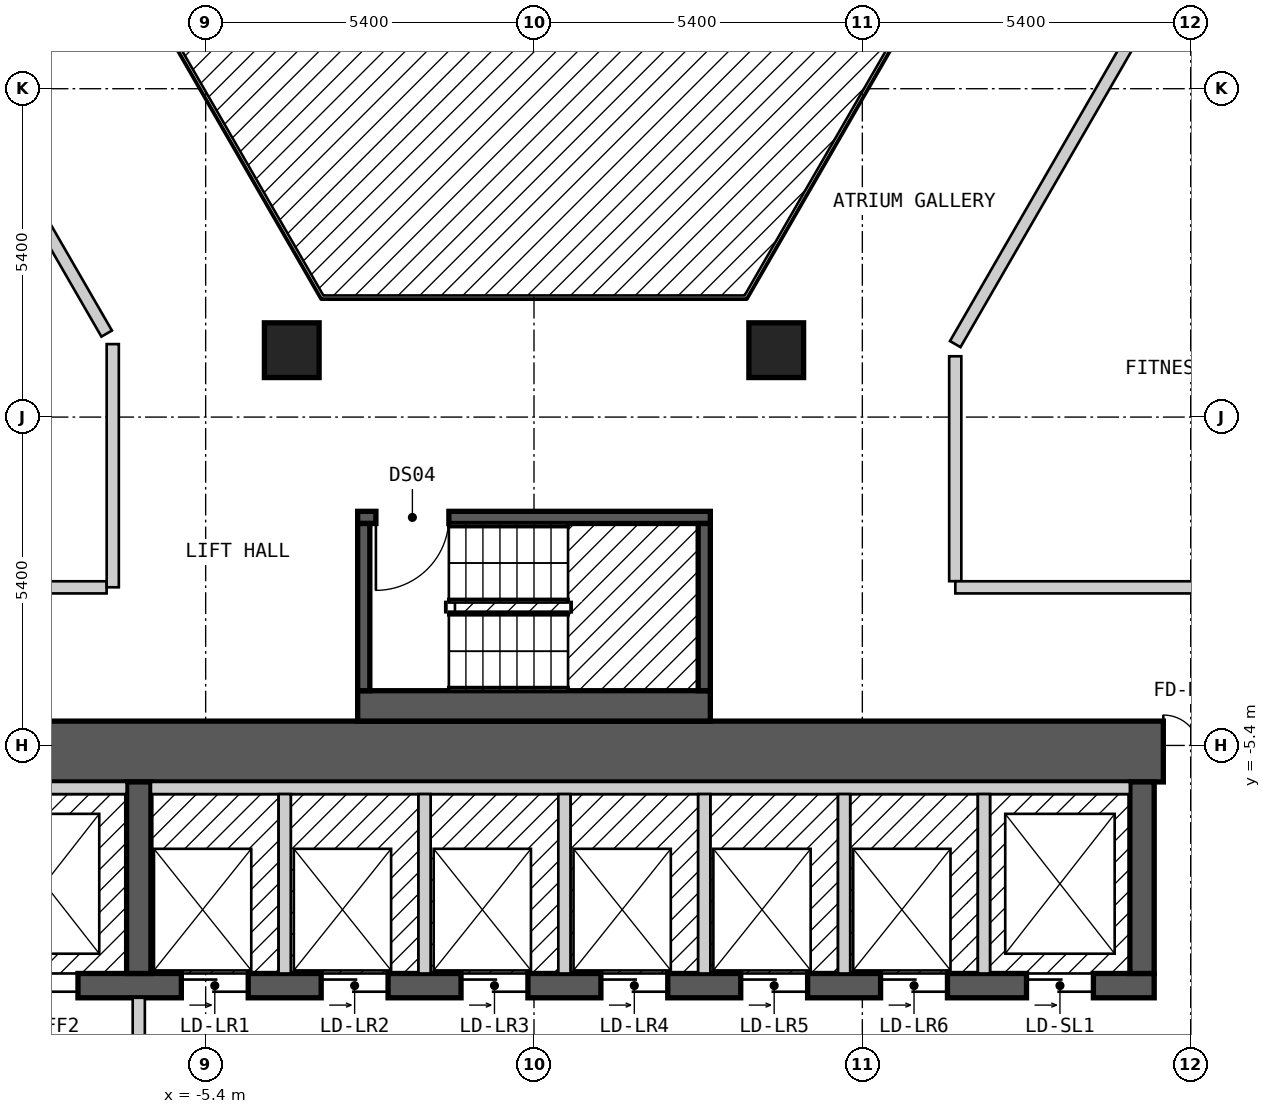
"""IFC4 building model, lengths in metres.
Left out: names, types, materials, properties, quantities, classifications, styles, units other than length and angle.
Written with IfcOpenShell. Run it as: python <this file> out.ifc"""

import sys

from ifc_helpers import new_model, si_unit, direction, frame, frame_2d, origin, origin_2d, place, context, subcontext, project, spatial, rectangle, extrude, element, fill, save


model = new_model("IFC4")
c1 = context("Model", 3, precision=1e-05, world=origin(), true_north=direction((0.0, 1.0)))
c2 = subcontext(c1, "Body", "Model", "MODEL_VIEW")
j1 = project(units=[si_unit("LENGTHUNIT", "METRE"), si_unit("PLANEANGLEUNIT", "RADIAN")], contexts=[c1])
p1 = place(None, origin())
s1 = spatial("IfcSite", under=j1, at=p1, CompositionType="ELEMENT")
p2 = place(p1, origin())
s2 = spatial("IfcBuilding", under=s1, at=p2, CompositionType="ELEMENT")
p3 = place(p2, frame((0.0, 0.0, 99.0)))
s3 = spatial("IfcBuildingStorey", under=s2, at=p3, CompositionType="ELEMENT", Elevation=99.0)
for number, where, z_axis, x_axis in (
    (1, (3.984, 1.1, 0.0), (0.0, 0.0, 1.0), (1.0, 0.0, 0.0)),
    (2, (-3.984, 1.1, 0.0), (0.0, 0.0, 1.0), (1.0, 0.0, 0.0)),
):
    element("IfcColumn", number, at=place(p3, frame(where, z_axis=z_axis, x_axis=x_axis)), inside=s3, PredefinedType="COLUMN", context=c2, shape_type="SweptSolid", body=[
        extrude(rectangle(XDim=0.9, YDim=0.9, at=origin_2d()), origin(), (0.0, 0.0, 1.0), 3.0),
    ])
p4 = place(p3, frame((-13.3, -5.5, 0.0), z_axis=(0.0, 0.0, 1.0), x_axis=(1.0, 0.0, 0.0)))
e3 = element("IfcWall", 3, at=p4, inside=s3, PredefinedType="SHEAR", context=c2, shape_type="SweptSolid", body=[
    extrude(rectangle(XDim=26.6, YDim=1.0, at=frame_2d((13.3, 0.0))), origin(), (0.0, 0.0, 1.0), 2.7),
])
p5 = place(p4, frame((23.65, 0.0, 0.0)))
e4 = element("IfcOpeningElement", 4, at=p5, cuts=e3, PredefinedType="OPENING", context=c2, shape_type="SweptSolid", body=[
    extrude(rectangle(XDim=1.2, YDim=2.1, at=frame_2d((0.6, 1.05))), frame((0.0, 0.51, 0.0), z_axis=(0.0, -1.0, 0.0), x_axis=(1.0, 0.0, 0.0)), (0.0, 0.0, 1.0), 1.02),
])
p6 = place(p3, frame((-12.3, -9.35, 0.0), z_axis=(0.0, 0.0, 1.0), x_axis=(1.0, 0.0, 0.0)))
e5 = element("IfcWall", 5, at=p6, inside=s3, PredefinedType="SHEAR", context=c2, shape_type="SweptSolid", body=[
    extrude(rectangle(XDim=22.5, YDim=0.4, at=frame_2d((11.25, 0.0))), origin(), (0.0, 0.0, 1.0), 2.7),
])
p7 = place(p6, frame((0.9, 0.0, 0.0)))
e6 = element("IfcOpeningElement", 6, at=p7, cuts=e5, PredefinedType="OPENING", context=c2, shape_type="SweptSolid", body=[
    extrude(rectangle(XDim=1.1, YDim=2.1, at=frame_2d((0.55, 1.05))), frame((0.0, 0.21, 0.0), z_axis=(0.0, -1.0, 0.0), x_axis=(1.0, 0.0, 0.0)), (0.0, 0.0, 1.0), 0.42),
])
p8 = place(p6, frame((3.7, 0.0, 0.0)))
e7 = element("IfcOpeningElement", 7, at=p8, cuts=e5, PredefinedType="OPENING", context=c2, shape_type="SweptSolid", body=[
    extrude(rectangle(XDim=1.1, YDim=2.1, at=frame_2d((0.55, 1.05))), frame((0.0, 0.21, 0.0), z_axis=(0.0, -1.0, 0.0), x_axis=(1.0, 0.0, 0.0)), (0.0, 0.0, 1.0), 0.42),
])
p9 = place(p6, frame((6.5, 0.0, 0.0)))
e8 = element("IfcOpeningElement", 8, at=p9, cuts=e5, PredefinedType="OPENING", context=c2, shape_type="SweptSolid", body=[
    extrude(rectangle(XDim=1.1, YDim=2.1, at=frame_2d((0.55, 1.05))), frame((0.0, 0.21, 0.0), z_axis=(0.0, -1.0, 0.0), x_axis=(1.0, 0.0, 0.0)), (0.0, 0.0, 1.0), 0.42),
])
p10 = place(p6, frame((8.8, 0.0, 0.0)))
e9 = element("IfcOpeningElement", 9, at=p10, cuts=e5, PredefinedType="OPENING", context=c2, shape_type="SweptSolid", body=[
    extrude(rectangle(XDim=1.1, YDim=2.1, at=frame_2d((0.55, 1.05))), frame((0.0, 0.21, 0.0), z_axis=(0.0, -1.0, 0.0), x_axis=(1.0, 0.0, 0.0)), (0.0, 0.0, 1.0), 0.42),
])
p11 = place(p6, frame((11.1, 0.0, 0.0)))
e10 = element("IfcOpeningElement", 10, at=p11, cuts=e5, PredefinedType="OPENING", context=c2, shape_type="SweptSolid", body=[
    extrude(rectangle(XDim=1.1, YDim=2.1, at=frame_2d((0.55, 1.05))), frame((0.0, 0.21, 0.0), z_axis=(0.0, -1.0, 0.0), x_axis=(1.0, 0.0, 0.0)), (0.0, 0.0, 1.0), 0.42),
])
p12 = place(p6, frame((13.4, 0.0, 0.0)))
e11 = element("IfcOpeningElement", 11, at=p12, cuts=e5, PredefinedType="OPENING", context=c2, shape_type="SweptSolid", body=[
    extrude(rectangle(XDim=1.1, YDim=2.1, at=frame_2d((0.55, 1.05))), frame((0.0, 0.21, 0.0), z_axis=(0.0, -1.0, 0.0), x_axis=(1.0, 0.0, 0.0)), (0.0, 0.0, 1.0), 0.42),
])
p13 = place(p6, frame((15.7, 0.0, 0.0)))
e12 = element("IfcOpeningElement", 12, at=p13, cuts=e5, PredefinedType="OPENING", context=c2, shape_type="SweptSolid", body=[
    extrude(rectangle(XDim=1.1, YDim=2.1, at=frame_2d((0.55, 1.05))), frame((0.0, 0.21, 0.0), z_axis=(0.0, -1.0, 0.0), x_axis=(1.0, 0.0, 0.0)), (0.0, 0.0, 1.0), 0.42),
])
p14 = place(p6, frame((18.0, 0.0, 0.0)))
e13 = element("IfcOpeningElement", 13, at=p14, cuts=e5, PredefinedType="OPENING", context=c2, shape_type="SweptSolid", body=[
    extrude(rectangle(XDim=1.1, YDim=2.1, at=frame_2d((0.55, 1.05))), frame((0.0, 0.21, 0.0), z_axis=(0.0, -1.0, 0.0), x_axis=(1.0, 0.0, 0.0)), (0.0, 0.0, 1.0), 0.42),
])
p15 = place(p6, frame((20.4, 0.0, 0.0)))
e14 = element("IfcOpeningElement", 14, at=p15, cuts=e5, PredefinedType="OPENING", context=c2, shape_type="SweptSolid", body=[
    extrude(rectangle(XDim=1.1, YDim=2.1, at=frame_2d((0.55, 1.05))), frame((0.0, 0.21, 0.0), z_axis=(0.0, -1.0, 0.0), x_axis=(1.0, 0.0, 0.0)), (0.0, 0.0, 1.0), 0.42),
])
for number, where, z_axis, x_axis in (
    (15, (-6.5, -9.15, 0.0), (0.0, 0.0, 1.0), (0.0, 1.0, 0.0)),
    (16, (10.0, -9.15, 0.0), (0.0, 0.0, 1.0), (0.0, 1.0, 0.0)),
):
    element("IfcWall", number, at=place(p3, frame(where, z_axis=z_axis, x_axis=x_axis)), inside=s3, PredefinedType="SHEAR", context=c2, shape_type="SweptSolid", body=[
        extrude(rectangle(XDim=3.15, YDim=0.4, at=frame_2d((1.575, 0.0))), origin(), (0.0, 0.0, 1.0), 2.7),
    ])
p16 = place(p3, frame((-2.9, -4.75, 0.0), z_axis=(0.0, 0.0, 1.0), x_axis=(1.0, 0.0, 0.0)))
e17 = element("IfcWall", 17, at=p16, inside=s3, PredefinedType="SOLIDWALL", context=c2, shape_type="SweptSolid", body=[
    extrude(rectangle(XDim=5.8, YDim=0.5, at=frame_2d((2.9, 0.0))), origin(), (0.0, 0.0, 1.0), 2.7),
])
p17 = place(p3, frame((-2.9, -1.65, 0.0), z_axis=(0.0, 0.0, 1.0), x_axis=(1.0, 0.0, 0.0)))
e18 = element("IfcWall", 18, at=p17, inside=s3, PredefinedType="SOLIDWALL", context=c2, shape_type="SweptSolid", body=[
    extrude(rectangle(XDim=5.8, YDim=0.2, at=frame_2d((2.9, 0.0))), origin(), (0.0, 0.0, 1.0), 2.7),
])
p18 = place(p17, frame((0.3, 0.0, 0.0)))
e19 = element("IfcOpeningElement", 19, at=p18, cuts=e18, PredefinedType="OPENING", context=c2, shape_type="SweptSolid", body=[
    extrude(rectangle(XDim=1.2, YDim=2.1, at=frame_2d((0.6, 1.05))), frame((0.0, 0.11, 0.0), z_axis=(0.0, -1.0, 0.0), x_axis=(1.0, 0.0, 0.0)), (0.0, 0.0, 1.0), 0.22),
])
for number, where, z_axis, x_axis in (
    (20, (-2.8, -4.5, 0.0), (0.0, 0.0, 1.0), (0.0, 1.0, 0.0)),
    (21, (2.8, -4.5, 0.0), (0.0, 0.0, 1.0), (0.0, 1.0, 0.0)),
):
    element("IfcWall", number, at=place(p3, frame(where, z_axis=z_axis, x_axis=x_axis)), inside=s3, PredefinedType="SOLIDWALL", context=c2, shape_type="SweptSolid", body=[
        extrude(rectangle(XDim=2.75, YDim=0.2, at=frame_2d((1.375, 0.0))), origin(), (0.0, 0.0, 1.0), 2.7),
    ])
p19 = place(p3, frame((-10.796, 7.899, 0.0), z_axis=(0.0, 0.0, 1.0), x_axis=(0.500010383074, -0.866019409031, 0.0)))
e22 = element("IfcWall", 22, at=p19, inside=s3, PredefinedType="PARTITIONING", context=c2, shape_type="SweptSolid", body=[
    extrude(rectangle(XDim=7.535, YDim=0.2, at=frame_2d((3.768, 0.0))), origin(), (0.0, 0.0, 1.0), 2.7),
])
p20 = place(p3, frame((8.488, 16.5, 0.0), z_axis=(0.0, 0.0, 1.0), x_axis=(0.499986836607, -0.86603300354, 0.0)))
e23 = element("IfcWall", 23, at=p20, inside=s3, PredefinedType="PARTITIONING", context=c2, shape_type="SweptSolid", body=[
    extrude(rectangle(XDim=20.09, YDim=0.2, at=frame_2d((10.045, 0.0))), origin(), (0.0, 0.0, 1.0), 2.7),
])
p21 = place(p20, frame((14.569, 0.0, 0.0)))
e24 = element("IfcOpeningElement", 24, at=p21, cuts=e23, PredefinedType="OPENING", context=c2, shape_type="SweptSolid", body=[
    extrude(rectangle(XDim=1.0, YDim=2.1, at=frame_2d((0.5, 1.05))), frame((0.0, 0.11, 0.0), z_axis=(0.0, -1.0, 0.0), x_axis=(1.0, 0.0, 0.0)), (0.0, 0.0, 1.0), 0.22),
])
p22 = place(p20, frame((4.547, 0.0, 0.0)))
e25 = element("IfcOpeningElement", 25, at=p22, cuts=e23, PredefinedType="OPENING", context=c2, shape_type="SweptSolid", body=[
    extrude(rectangle(XDim=1.0, YDim=2.1, at=frame_2d((0.5, 1.05))), frame((0.0, 0.11, 0.0), z_axis=(0.0, -1.0, 0.0), x_axis=(1.0, 0.0, 0.0)), (0.0, 0.0, 1.0), 0.22),
])
p23 = place(p3, frame((6.928, 1.0, 0.0), z_axis=(0.0, 0.0, 1.0), x_axis=(0.0, -1.0, 0.0)))
e26 = element("IfcWall", 26, at=p23, inside=s3, PredefinedType="PARTITIONING", context=c2, shape_type="SweptSolid", body=[
    extrude(rectangle(XDim=3.699, YDim=0.2, at=frame_2d((1.85, 0.0))), origin(), (0.0, 0.0, 1.0), 2.7),
])
p24 = place(p3, frame((-15.011, -2.8, 0.0), z_axis=(0.0, 0.0, 1.0), x_axis=(1.0, 0.0, 0.0)))
e27 = element("IfcWall", 27, at=p24, inside=s3, PredefinedType="PARTITIONING", context=c2, shape_type="SweptSolid", body=[
    extrude(rectangle(XDim=7.982, YDim=0.2, at=frame_2d((3.991, 0.0))), origin(), (0.0, 0.0, 1.0), 2.7),
])
p25 = place(p3, frame((6.929, -2.8, 0.0), z_axis=(0.0, 0.0, 1.0), x_axis=(1.0, 0.0, 0.0)))
e28 = element("IfcWall", 28, at=p25, inside=s3, PredefinedType="PARTITIONING", context=c2, shape_type="SweptSolid", body=[
    extrude(rectangle(XDim=7.966, YDim=0.2, at=frame_2d((3.983, 0.0))), origin(), (0.0, 0.0, 1.0), 2.7),
])
p26 = place(p3, frame((6.928, 1.2, 0.0), z_axis=(0.0, 0.0, 1.0), x_axis=(0.500055327065, 0.865993458332, 0.0)))
e29 = element("IfcWall", 29, at=p26, inside=s3, PredefinedType="PARTITIONING", context=c2, shape_type="SweptSolid", body=[
    extrude(rectangle(XDim=7.851, YDim=0.2, at=frame_2d((3.926, 0.0))), origin(), (0.0, 0.0, 1.0), 2.7),
])
p27 = place(p3, frame((-6.928, -2.799, 0.0), z_axis=(0.0, 0.0, 1.0), x_axis=(0.0, 1.0, 0.0)))
e30 = element("IfcWall", 30, at=p27, inside=s3, PredefinedType="PARTITIONING", context=c2, shape_type="SweptSolid", body=[
    extrude(rectangle(XDim=3.999, YDim=0.2, at=frame_2d((2.0, 0.0))), origin(), (0.0, 0.0, 1.0), 2.7),
])
p28 = place(p3, frame((-12.1, -6.1, 0.0), z_axis=(0.0, 0.0, 1.0), x_axis=(1.0, 0.0, 0.0)))
e31 = element("IfcWall", 31, at=p28, inside=s3, PredefinedType="SOLIDWALL", context=c2, shape_type="SweptSolid", body=[
    extrude(rectangle(XDim=5.4, YDim=0.2, at=frame_2d((2.7, 0.0))), origin(), (0.0, 0.0, 1.0), 2.7),
])
p29 = place(p3, frame((-6.5, -14.45, 0.0), z_axis=(0.0, 0.0, 1.0), x_axis=(0.0, 1.0, 0.0)))
e32 = element("IfcWall", 32, at=p29, inside=s3, PredefinedType="PARTITIONING", context=c2, shape_type="SweptSolid", body=[
    extrude(rectangle(XDim=4.9, YDim=0.2, at=frame_2d((2.45, 0.0))), origin(), (0.0, 0.0, 1.0), 2.7),
])
p30 = place(p29, frame((3.15, 0.0, 0.0), z_axis=(0.0, 0.0, 1.0), x_axis=(-1.0, 0.0, 0.0)))
e33 = element("IfcOpeningElement", 33, at=p30, cuts=e32, PredefinedType="OPENING", context=c2, shape_type="SweptSolid", body=[
    extrude(rectangle(XDim=1.4, YDim=2.1, at=frame_2d((0.7, 1.05))), frame((0.0, 0.11, 0.0), z_axis=(0.0, -1.0, 0.0), x_axis=(1.0, 0.0, 0.0)), (0.0, 0.0, 1.0), 0.22),
])
p31 = place(p3, frame((-6.3, -6.1, 0.0), z_axis=(0.0, 0.0, 1.0), x_axis=(1.0, 0.0, 0.0)))
e34 = element("IfcWall", 34, at=p31, inside=s3, PredefinedType="SOLIDWALL", context=c2, shape_type="SweptSolid", body=[
    extrude(rectangle(XDim=16.1, YDim=0.2, at=frame_2d((8.05, 0.0))), origin(), (0.0, 0.0, 1.0), 2.7),
])
for number, where, z_axis, x_axis in (
    (35, (-4.1, -9.15, 0.0), (0.0, 0.0, 1.0), (0.0, 1.0, 0.0)),
    (36, (-1.8, -9.15, 0.0), (0.0, 0.0, 1.0), (0.0, 1.0, 0.0)),
    (37, (0.5, -9.15, 0.0), (0.0, 0.0, 1.0), (0.0, 1.0, 0.0)),
    (38, (2.8, -9.15, 0.0), (0.0, 0.0, 1.0), (0.0, 1.0, 0.0)),
    (39, (5.1, -9.15, 0.0), (0.0, 0.0, 1.0), (0.0, 1.0, 0.0)),
    (40, (7.4, -9.15, 0.0), (0.0, 0.0, 1.0), (0.0, 1.0, 0.0)),
):
    element("IfcWall", number, at=place(p3, frame(where, z_axis=z_axis, x_axis=x_axis)), inside=s3, PredefinedType="SOLIDWALL", context=c2, shape_type="SweptSolid", body=[
        extrude(rectangle(XDim=2.95, YDim=0.2, at=frame_2d((1.475, 0.0))), origin(), (0.0, 0.0, 1.0), 2.7),
    ])
p32 = place(p18, origin())
e41 = element("IfcDoor", 41, at=p32, inside=s3, OperationType="SINGLE_SWING_LEFT", PredefinedType="DOOR", context=c2, shape_type="SweptSolid", body=[
    extrude(rectangle(XDim=1.2, YDim=2.1, at=frame_2d((0.6, 1.05))), frame((0.0, 0.025, 0.0), z_axis=(0.0, -1.0, 0.0), x_axis=(1.0, 0.0, 0.0)), (0.0, 0.0, 1.0), 0.05),
])
fill(e19, e41)
p33 = place(p8, origin())
e42 = element("IfcDoor", 42, at=p33, inside=s3, OperationType="DOUBLE_DOOR_SLIDING", PredefinedType="DOOR", context=c2, shape_type="SweptSolid", body=[
    extrude(rectangle(XDim=1.1, YDim=2.1, at=frame_2d((0.55, 1.05))), frame((0.0, 0.025, 0.0), z_axis=(0.0, -1.0, 0.0), x_axis=(1.0, 0.0, 0.0)), (0.0, 0.0, 1.0), 0.05),
])
fill(e7, e42)
p34 = place(p9, origin())
e43 = element("IfcDoor", 43, at=p34, inside=s3, OperationType="DOUBLE_DOOR_SLIDING", PredefinedType="DOOR", context=c2, shape_type="SweptSolid", body=[
    extrude(rectangle(XDim=1.1, YDim=2.1, at=frame_2d((0.55, 1.05))), frame((0.0, 0.025, 0.0), z_axis=(0.0, -1.0, 0.0), x_axis=(1.0, 0.0, 0.0)), (0.0, 0.0, 1.0), 0.05),
])
fill(e8, e43)
p35 = place(p10, origin())
e44 = element("IfcDoor", 44, at=p35, inside=s3, OperationType="DOUBLE_DOOR_SLIDING", PredefinedType="DOOR", context=c2, shape_type="SweptSolid", body=[
    extrude(rectangle(XDim=1.1, YDim=2.1, at=frame_2d((0.55, 1.05))), frame((0.0, 0.025, 0.0), z_axis=(0.0, -1.0, 0.0), x_axis=(1.0, 0.0, 0.0)), (0.0, 0.0, 1.0), 0.05),
])
fill(e9, e44)
p36 = place(p11, origin())
e45 = element("IfcDoor", 45, at=p36, inside=s3, OperationType="DOUBLE_DOOR_SLIDING", PredefinedType="DOOR", context=c2, shape_type="SweptSolid", body=[
    extrude(rectangle(XDim=1.1, YDim=2.1, at=frame_2d((0.55, 1.05))), frame((0.0, 0.025, 0.0), z_axis=(0.0, -1.0, 0.0), x_axis=(1.0, 0.0, 0.0)), (0.0, 0.0, 1.0), 0.05),
])
fill(e10, e45)
p37 = place(p12, origin())
e46 = element("IfcDoor", 46, at=p37, inside=s3, OperationType="DOUBLE_DOOR_SLIDING", PredefinedType="DOOR", context=c2, shape_type="SweptSolid", body=[
    extrude(rectangle(XDim=1.1, YDim=2.1, at=frame_2d((0.55, 1.05))), frame((0.0, 0.025, 0.0), z_axis=(0.0, -1.0, 0.0), x_axis=(1.0, 0.0, 0.0)), (0.0, 0.0, 1.0), 0.05),
])
fill(e11, e46)
p38 = place(p13, origin())
e47 = element("IfcDoor", 47, at=p38, inside=s3, OperationType="DOUBLE_DOOR_SLIDING", PredefinedType="DOOR", context=c2, shape_type="SweptSolid", body=[
    extrude(rectangle(XDim=1.1, YDim=2.1, at=frame_2d((0.55, 1.05))), frame((0.0, 0.025, 0.0), z_axis=(0.0, -1.0, 0.0), x_axis=(1.0, 0.0, 0.0)), (0.0, 0.0, 1.0), 0.05),
])
fill(e12, e47)
p39 = place(p14, origin())
e48 = element("IfcDoor", 48, at=p39, inside=s3, OperationType="DOUBLE_DOOR_SLIDING", PredefinedType="DOOR", context=c2, shape_type="SweptSolid", body=[
    extrude(rectangle(XDim=1.1, YDim=2.1, at=frame_2d((0.55, 1.05))), frame((0.0, 0.025, 0.0), z_axis=(0.0, -1.0, 0.0), x_axis=(1.0, 0.0, 0.0)), (0.0, 0.0, 1.0), 0.05),
])
fill(e13, e48)
p40 = place(p15, origin())
e49 = element("IfcDoor", 49, at=p40, inside=s3, OperationType="DOUBLE_DOOR_SLIDING", PredefinedType="DOOR", context=c2, shape_type="SweptSolid", body=[
    extrude(rectangle(XDim=1.1, YDim=2.1, at=frame_2d((0.55, 1.05))), frame((0.0, 0.025, 0.0), z_axis=(0.0, -1.0, 0.0), x_axis=(1.0, 0.0, 0.0)), (0.0, 0.0, 1.0), 0.05),
])
fill(e14, e49)
p41 = place(p5, origin())
e50 = element("IfcDoor", 50, at=p41, inside=s3, OperationType="DOUBLE_DOOR_SINGLE_SWING", PredefinedType="DOOR", context=c2, shape_type="SweptSolid", body=[
    extrude(rectangle(XDim=1.2, YDim=2.1, at=frame_2d((0.6, 1.05))), frame((0.0, 0.025, 0.0), z_axis=(0.0, -1.0, 0.0), x_axis=(1.0, 0.0, 0.0)), (0.0, 0.0, 1.0), 0.05),
])
fill(e4, e50)
save(model, sys.argv[1])
